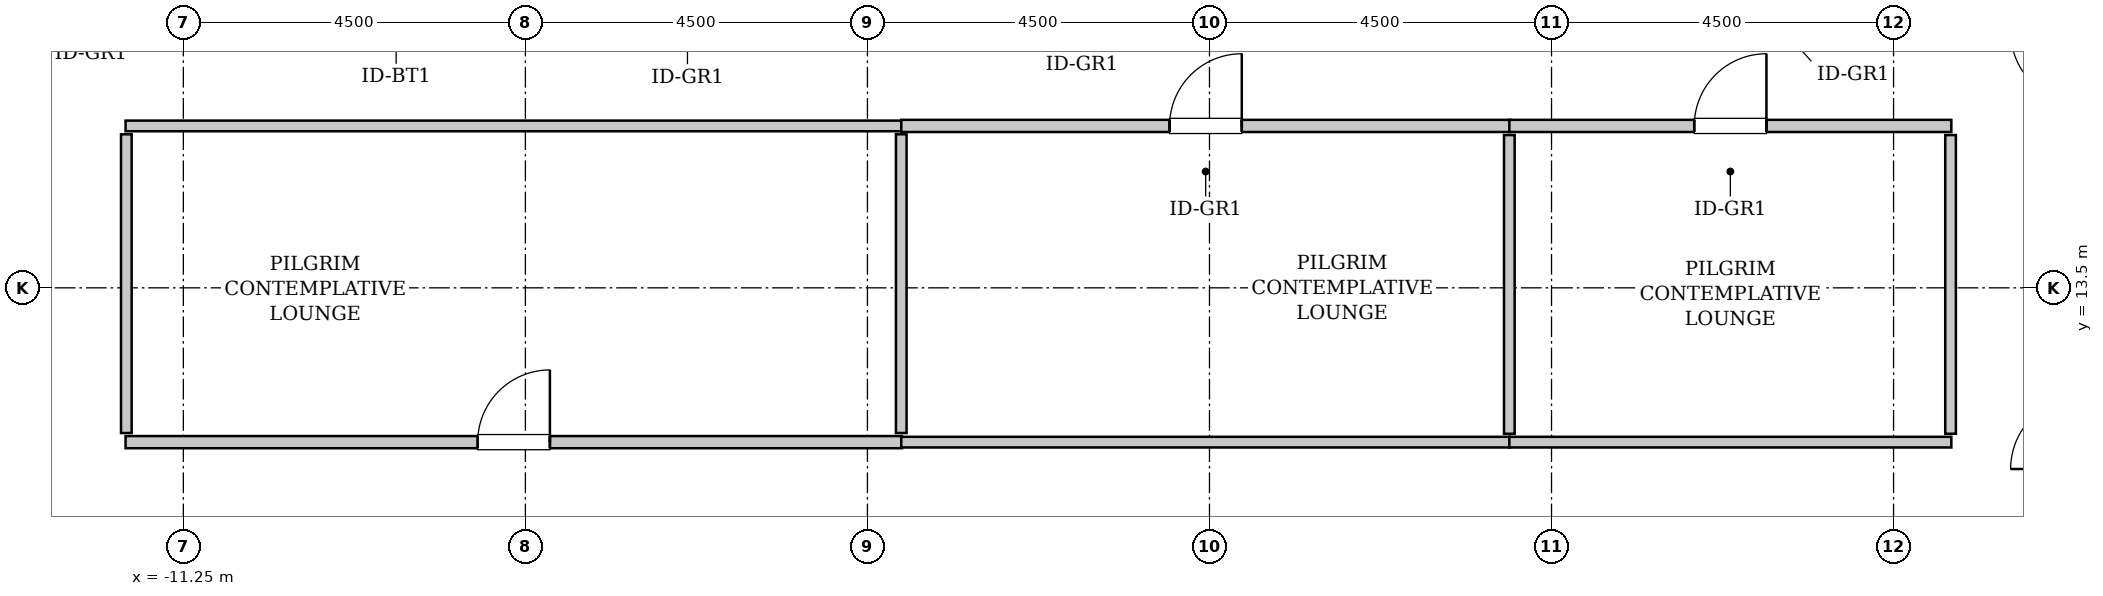
"""IFC4 building model, lengths in metres.
Left out: names, types, materials, properties, quantities, classifications, styles, units other than length and angle.
Written with IfcOpenShell. Run it as: python <this file> out.ifc"""

import sys

from ifc_helpers import new_model, si_unit, direction, frame, frame_2d, origin, place, context, subcontext, project, spatial, rectangle, extrude, source, transform, mapped, element, fill, save


model = new_model("IFC4")
c1 = context("Model", 3, precision=1e-05, world=origin(), true_north=direction((0.0, 1.0)))
c2 = subcontext(c1, "Body", "Model", "MODEL_VIEW")
j1 = project(units=[si_unit("LENGTHUNIT", "METRE"), si_unit("PLANEANGLEUNIT", "RADIAN")], contexts=[c1])
p1 = place(None, origin())
s1 = spatial("IfcSite", under=j1, at=p1, CompositionType="ELEMENT")
p2 = place(p1, origin())
s2 = spatial("IfcBuilding", under=s1, at=p2, CompositionType="ELEMENT")
p3 = place(p2, frame((0.0, 0.0, 229.4)))
s3 = spatial("IfcBuildingStorey", under=s2, at=p3, CompositionType="ELEMENT", Elevation=229.4)
m1 = source(origin(), c2, "Body", "SweptSolid", [
    extrude(rectangle(XDim=10.215, YDim=0.16, at=frame_2d((5.107, 0.0))), origin(), (0.0, 0.0, 1.0), 3.535),
])
p4 = place(p3, frame((-12.01, 11.47, 0.0), z_axis=(0.0, 0.0, 1.0), x_axis=(1.0, 0.0, 0.0)))
e1 = element("IfcWall", 1, at=p4, inside=s3, PredefinedType="PARTITIONING", context=c2, shape_type="MappedRepresentation", body=[
    mapped(m1, transform((0.0, 0.0, 0.0), x_axis=(1.0, 0.0, 0.0), y_axis=(0.0, 1.0, 0.0), z_axis=(0.0, 0.0, 1.0), scale=1.0)),
])
p5 = place(p4, frame((4.633, 0.0, 0.0)))
e2 = element("IfcOpeningElement", 2, at=p5, cuts=e1, PredefinedType="OPENING", context=c2, shape_type="SweptSolid", body=[
    extrude(rectangle(XDim=0.95, YDim=2.1, at=frame_2d((0.475, 1.05))), frame((0.0, 0.09, 0.0), z_axis=(0.0, -1.0, 0.0), x_axis=(1.0, 0.0, 0.0)), (0.0, 0.0, 1.0), 0.18),
])
m2 = source(origin(), c2, "Body", "SweptSolid", [
    extrude(rectangle(XDim=10.215, YDim=0.14, at=frame_2d((5.107, 0.0))), origin(), (0.0, 0.0, 1.0), 3.535),
])
p6 = place(p3, frame((-12.01, 15.63, 0.0), z_axis=(0.0, 0.0, 1.0), x_axis=(1.0, 0.0, 0.0)))
e3 = element("IfcWall", 3, at=p6, inside=s3, PredefinedType="PARTITIONING", context=c2, shape_type="MappedRepresentation", body=[
    mapped(m2, transform((0.0, 0.0, 0.0), x_axis=(1.0, 0.0, 0.0), y_axis=(0.0, 1.0, 0.0), z_axis=(0.0, 0.0, 1.0), scale=1.0)),
])
m3 = source(origin(), c2, "Body", "SweptSolid", [
    extrude(rectangle(XDim=3.93, YDim=0.14, at=frame_2d((1.965, 0.0))), origin(), (0.0, 0.0, 1.0), 3.535),
])
for number, where, z_axis, x_axis in (
    (4, (-12.0, 11.59, 0.0), (0.0, 0.0, 1.0), (0.0, 1.0, 0.0)),
    (5, (-1.805, 11.59, 0.0), (0.0, 0.0, 1.0), (0.0, 1.0, 0.0)),
):
    element("IfcWall", number, at=place(p3, frame(where, z_axis=z_axis, x_axis=x_axis)), inside=s3, PredefinedType="PARTITIONING", context=c2, shape_type="MappedRepresentation", body=[
        mapped(m3, transform((0.0, 0.0, 0.0), x_axis=(1.0, 0.0, 0.0), y_axis=(0.0, 1.0, 0.0), z_axis=(0.0, 0.0, 1.0), scale=1.0)),
    ])
m4 = source(origin(), c2, "Body", "SweptSolid", [
    extrude(rectangle(XDim=8.01, YDim=0.16, at=frame_2d((4.005, 0.0))), origin(), (0.0, 0.0, 1.0), 3.535),
])
p7 = place(p3, frame((-1.805, 15.63, 0.0), z_axis=(0.0, 0.0, 1.0), x_axis=(1.0, 0.0, 0.0)))
e6 = element("IfcWall", 6, at=p7, inside=s3, PredefinedType="PARTITIONING", context=c2, shape_type="MappedRepresentation", body=[
    mapped(m4, transform((0.0, 0.0, 0.0), x_axis=(1.0, 0.0, 0.0), y_axis=(0.0, 1.0, 0.0), z_axis=(0.0, 0.0, 1.0), scale=1.0)),
])
p8 = place(p7, frame((3.53, 0.0, 0.0)))
e7 = element("IfcOpeningElement", 7, at=p8, cuts=e6, PredefinedType="OPENING", context=c2, shape_type="SweptSolid", body=[
    extrude(rectangle(XDim=0.95, YDim=2.1, at=frame_2d((0.475, 1.05))), frame((0.0, 0.09, 0.0), z_axis=(0.0, -1.0, 0.0), x_axis=(1.0, 0.0, 0.0)), (0.0, 0.0, 1.0), 0.18),
])
m5 = source(origin(), c2, "Body", "SweptSolid", [
    extrude(rectangle(XDim=8.01, YDim=0.14, at=frame_2d((4.005, 0.0))), origin(), (0.0, 0.0, 1.0), 3.535),
])
p9 = place(p3, frame((-1.805, 11.47, 0.0), z_axis=(0.0, 0.0, 1.0), x_axis=(1.0, 0.0, 0.0)))
e8 = element("IfcWall", 8, at=p9, inside=s3, PredefinedType="PARTITIONING", context=c2, shape_type="MappedRepresentation", body=[
    mapped(m5, transform((0.0, 0.0, 0.0), x_axis=(1.0, 0.0, 0.0), y_axis=(0.0, 1.0, 0.0), z_axis=(0.0, 0.0, 1.0), scale=1.0)),
])
p10 = place(p3, frame((6.195, 11.58, 0.0), z_axis=(0.0, 0.0, 1.0), x_axis=(0.0, 1.0, 0.0)))
e9 = element("IfcWall", 9, at=p10, inside=s3, PredefinedType="PARTITIONING", context=c2, shape_type="MappedRepresentation", body=[
    mapped(m3, transform((0.0, 0.0, 0.0), x_axis=(1.0, 0.0, 0.0), y_axis=(0.0, 1.0, 0.0), z_axis=(0.0, 0.0, 1.0), scale=1.0)),
])
m6 = source(origin(), c2, "Body", "SweptSolid", [
    extrude(rectangle(XDim=5.815, YDim=0.16, at=frame_2d((2.907, 0.0))), origin(), (0.0, 0.0, 1.0), 3.535),
])
p11 = place(p3, frame((6.195, 15.63, 0.0), z_axis=(0.0, 0.0, 1.0), x_axis=(1.0, 0.0, 0.0)))
e10 = element("IfcWall", 10, at=p11, inside=s3, PredefinedType="PARTITIONING", context=c2, shape_type="MappedRepresentation", body=[
    mapped(m6, transform((0.0, 0.0, 0.0), x_axis=(1.0, 0.0, 0.0), y_axis=(0.0, 1.0, 0.0), z_axis=(0.0, 0.0, 1.0), scale=1.0)),
])
p12 = place(p11, frame((2.433, 0.0, 0.0)))
e11 = element("IfcOpeningElement", 11, at=p12, cuts=e10, PredefinedType="OPENING", context=c2, shape_type="SweptSolid", body=[
    extrude(rectangle(XDim=0.95, YDim=2.1, at=frame_2d((0.475, 1.05))), frame((0.0, 0.09, 0.0), z_axis=(0.0, -1.0, 0.0), x_axis=(1.0, 0.0, 0.0)), (0.0, 0.0, 1.0), 0.18),
])
m7 = source(origin(), c2, "Body", "SweptSolid", [
    extrude(rectangle(XDim=5.815, YDim=0.14, at=frame_2d((2.907, 0.0))), origin(), (0.0, 0.0, 1.0), 3.535),
])
p13 = place(p3, frame((6.195, 11.47, 0.0), z_axis=(0.0, 0.0, 1.0), x_axis=(1.0, 0.0, 0.0)))
e12 = element("IfcWall", 12, at=p13, inside=s3, PredefinedType="PARTITIONING", context=c2, shape_type="MappedRepresentation", body=[
    mapped(m7, transform((0.0, 0.0, 0.0), x_axis=(1.0, 0.0, 0.0), y_axis=(0.0, 1.0, 0.0), z_axis=(0.0, 0.0, 1.0), scale=1.0)),
])
p14 = place(p3, frame((12.0, 11.58, 0.0), z_axis=(0.0, 0.0, 1.0), x_axis=(0.0, 1.0, 0.0)))
e13 = element("IfcWall", 13, at=p14, inside=s3, PredefinedType="PARTITIONING", context=c2, shape_type="MappedRepresentation", body=[
    mapped(m3, transform((0.0, 0.0, 0.0), x_axis=(1.0, 0.0, 0.0), y_axis=(0.0, 1.0, 0.0), z_axis=(0.0, 0.0, 1.0), scale=1.0)),
])
m8 = source(origin(), c2, "Body", "SweptSolid", [
    extrude(rectangle(XDim=0.95, YDim=2.1, at=frame_2d((0.475, 1.05))), frame((0.0, 0.025, 0.0), z_axis=(0.0, -1.0, 0.0), x_axis=(1.0, 0.0, 0.0)), (0.0, 0.0, 1.0), 0.05),
])
p15 = place(p5, origin())
e14 = element("IfcDoor", 14, at=p15, inside=s3, OperationType="SINGLE_SWING_RIGHT", PredefinedType="DOOR", context=c2, shape_type="MappedRepresentation", body=[
    mapped(m8, transform((0.0, 0.0, 0.0), x_axis=(1.0, 0.0, 0.0), y_axis=(0.0, 1.0, 0.0), z_axis=(0.0, 0.0, 1.0), scale=1.0)),
])
fill(e2, e14)
p16 = place(p8, origin())
e15 = element("IfcDoor", 15, at=p16, inside=s3, OperationType="SINGLE_SWING_RIGHT", PredefinedType="DOOR", context=c2, shape_type="MappedRepresentation", body=[
    mapped(m8, transform((0.0, 0.0, 0.0), x_axis=(1.0, 0.0, 0.0), y_axis=(0.0, 1.0, 0.0), z_axis=(0.0, 0.0, 1.0), scale=1.0)),
])
fill(e7, e15)
p17 = place(p12, origin())
e16 = element("IfcDoor", 16, at=p17, inside=s3, OperationType="SINGLE_SWING_RIGHT", PredefinedType="DOOR", context=c2, shape_type="MappedRepresentation", body=[
    mapped(m8, transform((0.0, 0.0, 0.0), x_axis=(1.0, 0.0, 0.0), y_axis=(0.0, 1.0, 0.0), z_axis=(0.0, 0.0, 1.0), scale=1.0)),
])
fill(e11, e16)
save(model, sys.argv[1])
